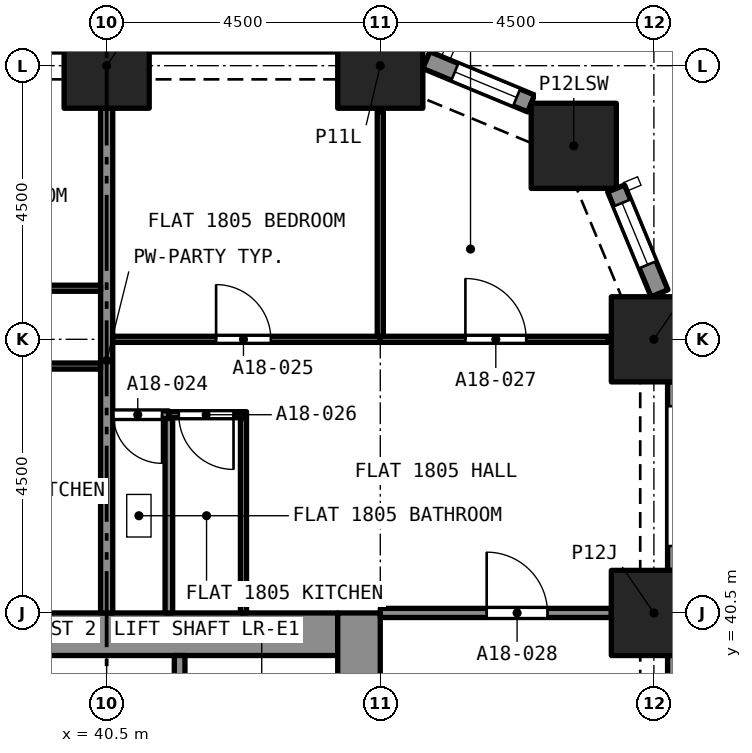
"""IFC4 building model, lengths in metres.
Left out: names, types, materials, properties, quantities, classifications, styles, units other than length and angle.
Written with IfcOpenShell. Run it as: python <this file> out.ifc"""

import sys

from ifc_helpers import new_model, si_unit, direction, frame, frame_2d, origin, origin_2d, place, context, subcontext, project, spatial, rectangle, extrude, element, fill, save


model = new_model("IFC4")
c1 = context("Model", 3, precision=1e-05, world=origin(), true_north=direction((0.0, 1.0)))
c2 = subcontext(c1, "Body", "Model", "MODEL_VIEW")
j1 = project(units=[si_unit("LENGTHUNIT", "METRE"), si_unit("PLANEANGLEUNIT", "RADIAN")], contexts=[c1])
p1 = place(None, origin())
s1 = spatial("IfcSite", under=j1, at=p1, CompositionType="ELEMENT")
p2 = place(p1, origin())
s2 = spatial("IfcBuilding", under=s1, at=p2, CompositionType="ELEMENT")
p3 = place(p2, frame((0.0, 0.0, 68.8)))
s3 = spatial("IfcBuildingStorey", under=s2, at=p3, CompositionType="ELEMENT", Elevation=68.8)
for number, where, z_axis, x_axis in (
    (1, (49.5, 40.5, 0.0), (0.0, 0.0, 1.0), (1.0, 0.0, 0.0)),
    (2, (49.5, 45.0, 0.0), (0.0, 0.0, 1.0), (1.0, 0.0, 0.0)),
    (3, (48.182, 48.182, 0.0), (0.0, 0.0, 1.0), (1.0, 0.0, 0.0)),
    (4, (40.5, 49.5, 0.0), (0.0, 0.0, 1.0), (1.0, 0.0, 0.0)),
    (5, (45.0, 49.5, 0.0), (0.0, 0.0, 1.0), (1.0, 0.0, 0.0)),
):
    element("IfcColumn", number, at=place(p3, frame(where, z_axis=z_axis, x_axis=x_axis)), inside=s3, PredefinedType="COLUMN", context=c2, shape_type="SweptSolid", body=[
        extrude(rectangle(XDim=1.4, YDim=1.4, at=origin_2d()), origin(), (0.0, 0.0, 1.0), 3.2),
    ])
p4 = place(p3, frame((36.7, 40.15, 0.0), z_axis=(0.0, 0.0, 1.0), x_axis=(1.0, 0.0, 0.0)))
e6 = element("IfcWall", 6, at=p4, inside=s3, PredefinedType="SOLIDWALL", context=c2, shape_type="SweptSolid", body=[
    extrude(rectangle(XDim=7.6, YDim=0.7, at=frame_2d((3.8, 0.0))), origin(), (0.0, 0.0, 1.0), 3.2),
])
p5 = place(p3, frame((44.65, 27.0, 0.0), z_axis=(0.0, 0.0, 1.0), x_axis=(0.0, 1.0, 0.0)))
e7 = element("IfcWall", 7, at=p5, inside=s3, PredefinedType="SOLIDWALL", context=c2, shape_type="SweptSolid", body=[
    extrude(rectangle(XDim=13.5, YDim=0.7, at=frame_2d((6.75, 0.0))), origin(), (0.0, 0.0, 1.0), 3.2),
])
p6 = place(p5, frame((8.95, 0.0, 0.0)))
e8 = element("IfcOpeningElement", 8, at=p6, cuts=e7, PredefinedType="OPENING", context=c2, shape_type="SweptSolid", body=[
    extrude(rectangle(XDim=1.2, YDim=2.1, at=frame_2d((0.6, 1.05))), frame((0.0, 0.36, 0.0), z_axis=(0.0, -1.0, 0.0), x_axis=(1.0, 0.0, 0.0)), (0.0, 0.0, 1.0), 0.72),
])
p7 = place(p3, frame((49.875, 39.8, 0.0), z_axis=(0.0, 0.0, 1.0), x_axis=(0.0, -1.0, 0.0)))
e9 = element("IfcWall", 9, at=p7, inside=s3, PredefinedType="SOLIDWALL", context=c2, shape_type="SweptSolid", body=[
    extrude(rectangle(XDim=3.1, YDim=0.3, at=frame_2d((1.55, 0.0))), origin(), (0.0, 0.0, 1.0), 3.2),
])
p8 = place(p7, frame((0.4, 0.0, 0.45)))
e10 = element("IfcOpeningElement", 10, at=p8, cuts=e9, PredefinedType="OPENING", context=c2, shape_type="SweptSolid", body=[
    extrude(rectangle(XDim=2.3, YDim=1.95, at=frame_2d((1.15, 0.975))), frame((0.0, 0.16, 0.0), z_axis=(0.0, -1.0, 0.0), x_axis=(1.0, 0.0, 0.0)), (0.0, 0.0, 1.0), 0.32),
])
p9 = place(p3, frame((49.875, 44.3, 0.0), z_axis=(0.0, 0.0, 1.0), x_axis=(0.0, -1.0, 0.0)))
e11 = element("IfcWall", 11, at=p9, inside=s3, PredefinedType="SOLIDWALL", context=c2, shape_type="SweptSolid", body=[
    extrude(rectangle(XDim=3.1, YDim=0.3, at=frame_2d((1.55, 0.0))), origin(), (0.0, 0.0, 1.0), 3.2),
])
p10 = place(p9, frame((0.4, 0.0, 0.45)))
e12 = element("IfcOpeningElement", 12, at=p10, cuts=e11, PredefinedType="OPENING", context=c2, shape_type="SweptSolid", body=[
    extrude(rectangle(XDim=2.3, YDim=1.95, at=frame_2d((1.15, 0.975))), frame((0.0, 0.16, 0.0), z_axis=(0.0, -1.0, 0.0), x_axis=(1.0, 0.0, 0.0)), (0.0, 0.0, 1.0), 0.32),
])
p11 = place(p3, frame((48.878, 47.48, 0.0), z_axis=(0.0, 0.0, 1.0), x_axis=(0.38262540684, -0.923903565336, 0.0)))
e13 = element("IfcWall", 13, at=p11, inside=s3, PredefinedType="SOLIDWALL", context=c2, shape_type="SweptSolid", body=[
    extrude(rectangle(XDim=1.865, YDim=0.3, at=frame_2d((0.933, 0.0))), origin(), (0.0, 0.0, 1.0), 3.2),
])
p12 = place(p11, frame((0.258, 0.0, 0.45)))
e14 = element("IfcOpeningElement", 14, at=p12, cuts=e13, PredefinedType="OPENING", context=c2, shape_type="SweptSolid", body=[
    extrude(rectangle(XDim=1.1, YDim=1.95, at=frame_2d((0.55, 0.975))), frame((0.0, 0.16, 0.0), z_axis=(0.0, -1.0, 0.0), x_axis=(1.0, 0.0, 0.0)), (0.0, 0.0, 1.0), 0.32),
])
p13 = place(p3, frame((45.757, 49.592, 0.0), z_axis=(0.0, 0.0, 1.0), x_axis=(0.923857286003, -0.382737135771, 0.0)))
e15 = element("IfcWall", 15, at=p13, inside=s3, PredefinedType="SOLIDWALL", context=c2, shape_type="SweptSolid", body=[
    extrude(rectangle(XDim=1.865, YDim=0.3, at=frame_2d((0.933, 0.0))), origin(), (0.0, 0.0, 1.0), 3.2),
])
p14 = place(p13, frame((0.508, 0.0, 0.45)))
e16 = element("IfcOpeningElement", 16, at=p14, cuts=e15, PredefinedType="OPENING", context=c2, shape_type="SweptSolid", body=[
    extrude(rectangle(XDim=1.1, YDim=1.95, at=frame_2d((0.55, 0.975))), frame((0.0, 0.16, 0.0), z_axis=(0.0, -1.0, 0.0), x_axis=(1.0, 0.0, 0.0)), (0.0, 0.0, 1.0), 0.32),
])
p15 = place(p3, frame((41.523, 43.76, 0.0), z_axis=(0.0, 0.0, 1.0), x_axis=(-1.0, 0.0, 0.0)))
e17 = element("IfcWall", 17, at=p15, inside=s3, PredefinedType="PARTITIONING", context=c2, shape_type="SweptSolid", body=[
    extrude(rectangle(XDim=0.923, YDim=0.125, at=frame_2d((0.461, 0.0))), origin(), (0.0, 0.0, 1.0), 2.9),
])
p16 = place(p15, frame((0.111, 0.0, 0.0)))
e18 = element("IfcOpeningElement", 18, at=p16, cuts=e17, PredefinedType="OPENING", context=c2, shape_type="SweptSolid", body=[
    extrude(rectangle(XDim=0.8, YDim=2.1, at=frame_2d((0.4, 1.05))), frame((0.0, 0.073, 0.0), z_axis=(0.0, -1.0, 0.0), x_axis=(1.0, 0.0, 0.0)), (0.0, 0.0, 1.0), 0.145),
])
p17 = place(p3, frame((41.523, 40.5, 0.0), z_axis=(0.0, 0.0, 1.0), x_axis=(0.0, 1.0, 0.0)))
e19 = element("IfcWall", 19, at=p17, inside=s3, PredefinedType="PARTITIONING", context=c2, shape_type="SweptSolid", body=[
    extrude(rectangle(XDim=3.198, YDim=0.125, at=frame_2d((1.599, 0.0))), origin(), (0.0, 0.0, 1.0), 2.9),
])
p18 = place(p3, frame((40.5, 40.5, 0.0), z_axis=(0.0, 0.0, 1.0), x_axis=(0.0, 1.0, 0.0)))
e20 = element("IfcWall", 20, at=p18, inside=s3, PredefinedType="PARTITIONING", context=c2, shape_type="SweptSolid", body=[
    extrude(rectangle(XDim=8.3, YDim=0.2, at=frame_2d((4.15, 0.0))), origin(), (0.0, 0.0, 1.0), 2.9),
])
p19 = place(p3, frame((40.6, 45.0, 0.0), z_axis=(0.0, 0.0, 1.0), x_axis=(1.0, 0.0, 0.0)))
e21 = element("IfcWall", 21, at=p19, inside=s3, PredefinedType="PARTITIONING", context=c2, shape_type="SweptSolid", body=[
    extrude(rectangle(XDim=4.4, YDim=0.1, at=frame_2d((2.2, 0.0))), origin(), (0.0, 0.0, 1.0), 2.9),
])
p20 = place(p19, frame((1.7, 0.0, 0.0)))
e22 = element("IfcOpeningElement", 22, at=p20, cuts=e21, PredefinedType="OPENING", context=c2, shape_type="SweptSolid", body=[
    extrude(rectangle(XDim=0.9, YDim=2.1, at=frame_2d((0.45, 1.05))), frame((0.0, 0.06, 0.0), z_axis=(0.0, -1.0, 0.0), x_axis=(1.0, 0.0, 0.0)), (0.0, 0.0, 1.0), 0.12),
])
p21 = place(p3, frame((45.0, 45.05, 0.0), z_axis=(0.0, 0.0, 1.0), x_axis=(0.0, 1.0, 0.0)))
e23 = element("IfcWall", 23, at=p21, inside=s3, PredefinedType="PARTITIONING", context=c2, shape_type="SweptSolid", body=[
    extrude(rectangle(XDim=3.692, YDim=0.1, at=frame_2d((1.846, 0.0))), origin(), (0.0, 0.0, 1.0), 2.9),
])
p22 = place(p3, frame((42.75, 40.5, 0.0), z_axis=(0.0, 0.0, 1.0), x_axis=(0.0, 1.0, 0.0)))
e24 = element("IfcWall", 24, at=p22, inside=s3, PredefinedType="PARTITIONING", context=c2, shape_type="SweptSolid", body=[
    extrude(rectangle(XDim=3.21, YDim=0.1, at=frame_2d((1.605, 0.0))), origin(), (0.0, 0.0, 1.0), 2.9),
])
p23 = place(p3, frame((42.8, 43.76, 0.0), z_axis=(0.0, 0.0, 1.0), x_axis=(-1.0, 0.0, 0.0)))
e25 = element("IfcWall", 25, at=p23, inside=s3, PredefinedType="PARTITIONING", context=c2, shape_type="SweptSolid", body=[
    extrude(rectangle(XDim=1.277, YDim=0.1, at=frame_2d((0.639, 0.0))), origin(), (0.0, 0.0, 1.0), 2.9),
])
p24 = place(p23, frame((0.214, 0.0, 0.0)))
e26 = element("IfcOpeningElement", 26, at=p24, cuts=e25, PredefinedType="OPENING", context=c2, shape_type="SweptSolid", body=[
    extrude(rectangle(XDim=0.9, YDim=2.1, at=frame_2d((0.45, 1.05))), frame((0.0, 0.06, 0.0), z_axis=(0.0, -1.0, 0.0), x_axis=(1.0, 0.0, 0.0)), (0.0, 0.0, 1.0), 0.12),
])
p25 = place(p3, frame((45.0, 45.0, 0.0), z_axis=(0.0, 0.0, 1.0), x_axis=(1.0, 0.0, 0.0)))
e27 = element("IfcWall", 27, at=p25, inside=s3, PredefinedType="PARTITIONING", context=c2, shape_type="SweptSolid", body=[
    extrude(rectangle(XDim=3.742, YDim=0.1, at=frame_2d((1.871, 0.0))), origin(), (0.0, 0.0, 1.0), 2.9),
])
p26 = place(p25, frame((1.4, 0.0, 0.0)))
e28 = element("IfcOpeningElement", 28, at=p26, cuts=e27, PredefinedType="OPENING", context=c2, shape_type="SweptSolid", body=[
    extrude(rectangle(XDim=1.0, YDim=2.1, at=frame_2d((0.5, 1.05))), frame((0.0, 0.06, 0.0), z_axis=(0.0, -1.0, 0.0), x_axis=(1.0, 0.0, 0.0)), (0.0, 0.0, 1.0), 0.12),
])
p27 = place(p3, frame((45.0, 40.5, 0.0), z_axis=(0.0, 0.0, 1.0), x_axis=(1.0, 0.0, 0.0)))
e29 = element("IfcWall", 29, at=p27, inside=s3, PredefinedType="PARTITIONING", context=c2, shape_type="SweptSolid", body=[
    extrude(rectangle(XDim=3.8, YDim=0.15, at=frame_2d((1.9, 0.0))), origin(), (0.0, 0.0, 1.0), 2.9),
])
p28 = place(p27, frame((1.75, 0.0, 0.0)))
e30 = element("IfcOpeningElement", 30, at=p28, cuts=e29, PredefinedType="OPENING", context=c2, shape_type="SweptSolid", body=[
    extrude(rectangle(XDim=1.0, YDim=2.1, at=frame_2d((0.5, 1.05))), frame((0.0, 0.085, 0.0), z_axis=(0.0, -1.0, 0.0), x_axis=(1.0, 0.0, 0.0)), (0.0, 0.0, 1.0), 0.17),
])
p29 = place(p3, frame((36.0, 45.84, 0.0), z_axis=(0.0, 0.0, 1.0), x_axis=(1.0, 0.0, 0.0)))
e31 = element("IfcWall", 31, at=p29, inside=s3, PredefinedType="PARTITIONING", context=c2, shape_type="SweptSolid", body=[
    extrude(rectangle(XDim=4.4, YDim=0.1, at=frame_2d((2.2, 0.0))), origin(), (0.0, 0.0, 1.0), 2.9),
])
p30 = place(p29, frame((1.8, 0.0, 0.0)))
e32 = element("IfcOpeningElement", 32, at=p30, cuts=e31, PredefinedType="OPENING", context=c2, shape_type="SweptSolid", body=[
    extrude(rectangle(XDim=0.9, YDim=2.1, at=frame_2d((0.45, 1.05))), frame((0.0, 0.06, 0.0), z_axis=(0.0, -1.0, 0.0), x_axis=(1.0, 0.0, 0.0)), (0.0, 0.0, 1.0), 0.12),
])
p31 = place(p3, frame((40.4, 44.56, 0.0), z_axis=(0.0, 0.0, 1.0), x_axis=(-1.0, 0.0, 0.0)))
e33 = element("IfcWall", 33, at=p31, inside=s3, PredefinedType="PARTITIONING", context=c2, shape_type="SweptSolid", body=[
    extrude(rectangle(XDim=3.168, YDim=0.1, at=frame_2d((1.584, 0.0))), origin(), (0.0, 0.0, 1.0), 2.9),
])
p32 = place(p31, frame((1.084, 0.0, 0.0)))
e34 = element("IfcOpeningElement", 34, at=p32, cuts=e33, PredefinedType="OPENING", context=c2, shape_type="SweptSolid", body=[
    extrude(rectangle(XDim=0.9, YDim=2.1, at=frame_2d((0.45, 1.05))), frame((0.0, 0.06, 0.0), z_axis=(0.0, -1.0, 0.0), x_axis=(1.0, 0.0, 0.0)), (0.0, 0.0, 1.0), 0.12),
])
p33 = place(p3, frame((41.7, 37.5, 0.0), z_axis=(0.0, 0.0, 1.0), x_axis=(0.0, 1.0, 0.0)))
e35 = element("IfcWall", 35, at=p33, inside=s3, PredefinedType="SOLIDWALL", context=c2, shape_type="SweptSolid", body=[
    extrude(rectangle(XDim=2.3, YDim=0.175, at=frame_2d((1.15, 0.0))), origin(), (0.0, 0.0, 1.0), 2.9),
])
p34 = place(p12, origin())
e36 = element("IfcWindow", 36, at=p34, inside=s3, PartitioningType="SINGLE_PANEL", PredefinedType="WINDOW", context=c2, shape_type="SweptSolid", body=[
    extrude(rectangle(XDim=1.1, YDim=1.95, at=frame_2d((0.55, 0.975))), frame((0.0, 0.03, 0.0), z_axis=(0.0, -1.0, 0.0), x_axis=(1.0, 0.0, 0.0)), (0.0, 0.0, 1.0), 0.06),
])
fill(e14, e36)
p35 = place(p14, origin())
e37 = element("IfcWindow", 37, at=p35, inside=s3, PartitioningType="SINGLE_PANEL", PredefinedType="WINDOW", context=c2, shape_type="SweptSolid", body=[
    extrude(rectangle(XDim=1.1, YDim=1.95, at=frame_2d((0.55, 0.975))), frame((0.0, 0.03, 0.0), z_axis=(0.0, -1.0, 0.0), x_axis=(1.0, 0.0, 0.0)), (0.0, 0.0, 1.0), 0.06),
])
fill(e16, e37)
p36 = place(p16, origin())
e38 = element("IfcDoor", 38, at=p36, inside=s3, OperationType="SINGLE_SWING_RIGHT", PredefinedType="DOOR", context=c2, shape_type="SweptSolid", body=[
    extrude(rectangle(XDim=0.8, YDim=2.1, at=frame_2d((0.4, 1.05))), frame((0.0, 0.025, 0.0), z_axis=(0.0, -1.0, 0.0), x_axis=(1.0, 0.0, 0.0)), (0.0, 0.0, 1.0), 0.05),
])
fill(e18, e38)
p37 = place(p20, origin())
e39 = element("IfcDoor", 39, at=p37, inside=s3, OperationType="SINGLE_SWING_LEFT", PredefinedType="DOOR", context=c2, shape_type="SweptSolid", body=[
    extrude(rectangle(XDim=0.9, YDim=2.1, at=frame_2d((0.45, 1.05))), frame((0.0, 0.025, 0.0), z_axis=(0.0, -1.0, 0.0), x_axis=(1.0, 0.0, 0.0)), (0.0, 0.0, 1.0), 0.05),
])
fill(e22, e39)
p38 = place(p24, origin())
e40 = element("IfcDoor", 40, at=p38, inside=s3, OperationType="SINGLE_SWING_RIGHT", PredefinedType="DOOR", context=c2, shape_type="SweptSolid", body=[
    extrude(rectangle(XDim=0.9, YDim=2.1, at=frame_2d((0.45, 1.05))), frame((0.0, 0.025, 0.0), z_axis=(0.0, -1.0, 0.0), x_axis=(1.0, 0.0, 0.0)), (0.0, 0.0, 1.0), 0.05),
])
fill(e26, e40)
p39 = place(p26, origin())
e41 = element("IfcDoor", 41, at=p39, inside=s3, OperationType="SINGLE_SWING_RIGHT", PredefinedType="DOOR", context=c2, shape_type="SweptSolid", body=[
    extrude(rectangle(XDim=1.0, YDim=2.1, at=frame_2d((0.5, 1.05))), frame((0.0, 0.025, 0.0), z_axis=(0.0, -1.0, 0.0), x_axis=(1.0, 0.0, 0.0)), (0.0, 0.0, 1.0), 0.05),
])
fill(e28, e41)
p40 = place(p28, origin())
e42 = element("IfcDoor", 42, at=p40, inside=s3, OperationType="SINGLE_SWING_RIGHT", PredefinedType="DOOR", context=c2, shape_type="SweptSolid", body=[
    extrude(rectangle(XDim=1.0, YDim=2.1, at=frame_2d((0.5, 1.05))), frame((0.0, 0.025, 0.0), z_axis=(0.0, -1.0, 0.0), x_axis=(1.0, 0.0, 0.0)), (0.0, 0.0, 1.0), 0.05),
])
fill(e30, e42)
save(model, sys.argv[1])
